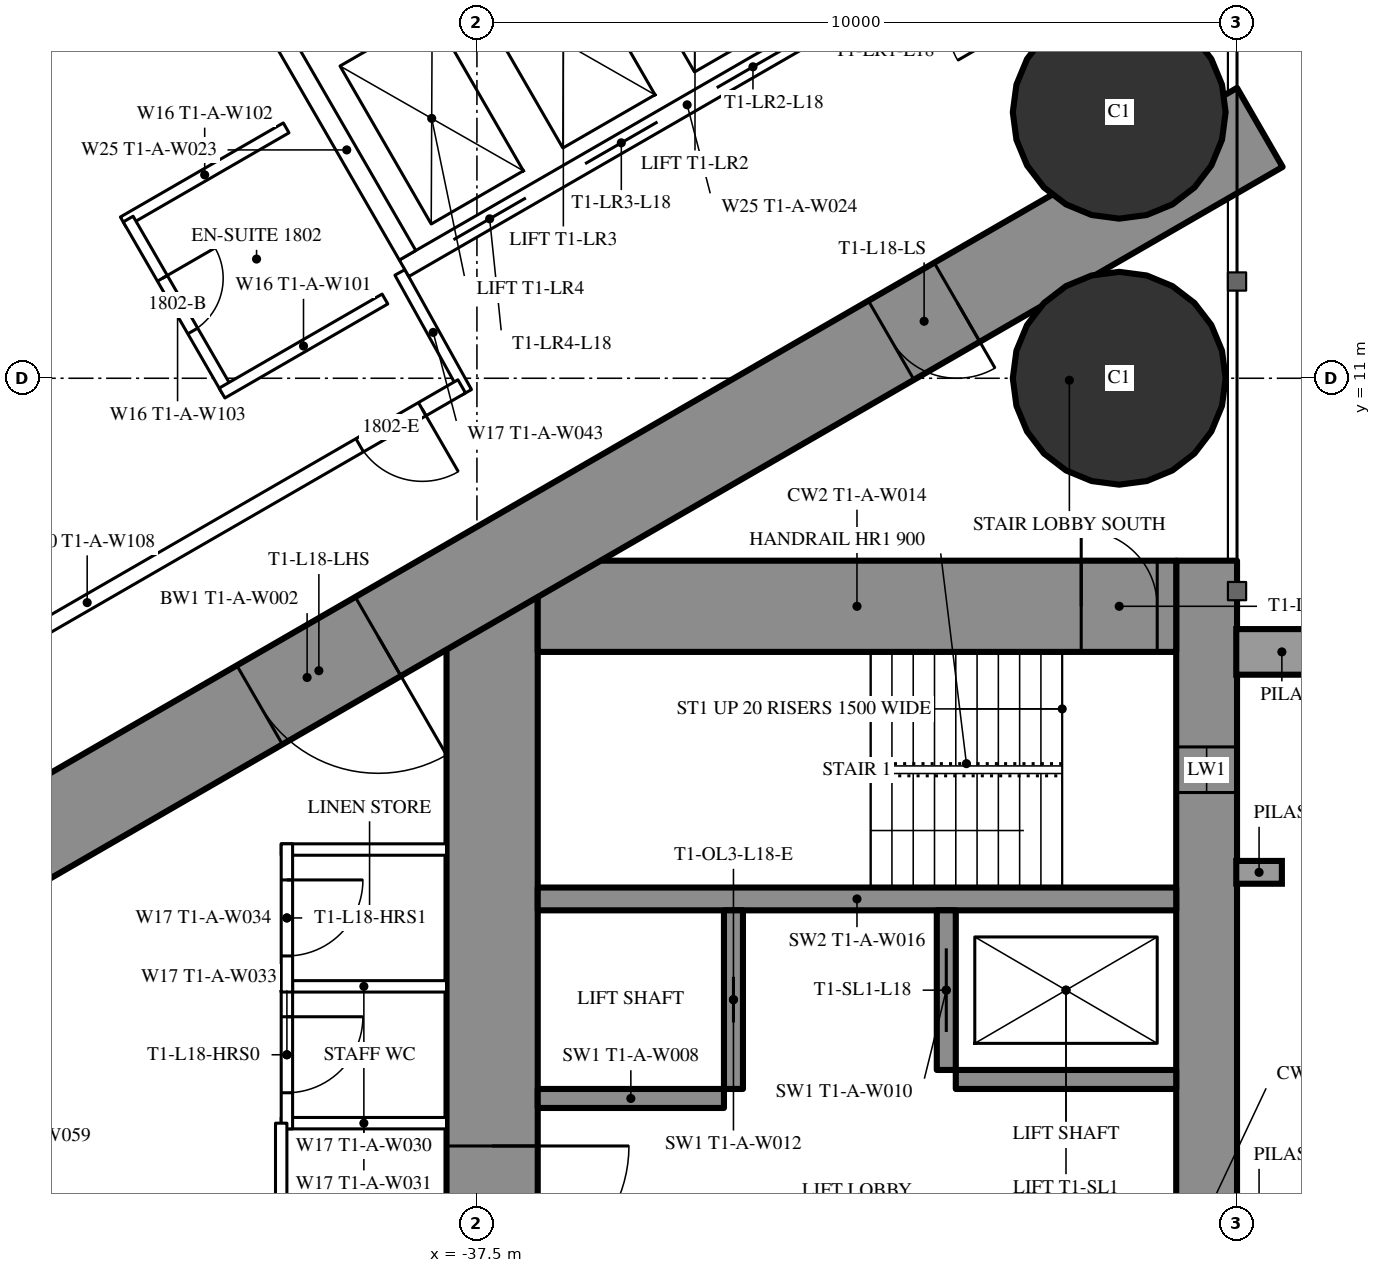
"""IFC4 building model, lengths in metres.
Left out: names, types, materials, properties, quantities, classifications, styles, units other than length and angle.
Written with IfcOpenShell. Run it as: python <this file> out.ifc"""

import sys

from ifc_helpers import new_model, si_unit, direction, frame, frame_2d, origin, origin_2d, place, context, subcontext, project, spatial, rectangle, hollow_circle, extrude, element, fill, save


model = new_model("IFC4")
c1 = context("Model", 3, precision=1e-05, world=origin(), true_north=direction((0.0, 1.0)))
c2 = subcontext(c1, "Body", "Model", "MODEL_VIEW")
j1 = project(units=[si_unit("LENGTHUNIT", "METRE"), si_unit("PLANEANGLEUNIT", "RADIAN")], contexts=[c1])
p1 = place(None, origin())
s1 = spatial("IfcSite", under=j1, at=p1, CompositionType="ELEMENT")
p2 = place(p1, origin())
s2 = spatial("IfcBuilding", under=s1, at=p2, CompositionType="ELEMENT")
p3 = place(p2, frame((0.0, 0.0, 70.5)))
s3 = spatial("IfcBuildingStorey", under=s2, at=p3, CompositionType="ELEMENT", Elevation=70.5)
for number, where, z_axis, x_axis in (
    (1, (-29.05, 11.0, 0.0), (0.0, 0.0, 1.0), (1.0, 0.0, 0.0)),
    (2, (-29.05, 14.5, 0.0), (0.0, 0.0, 1.0), (1.0, 0.0, 0.0)),
):
    element("IfcColumn", number, at=place(p3, frame(where, z_axis=z_axis, x_axis=x_axis)), inside=s3, PredefinedType="COLUMN", context=c2, shape_type="SweptSolid", body=[
        extrude(hollow_circle(Radius=1.4, WallThickness=0.12, at=origin_2d()), origin(), (0.0, 0.0, 1.0), 3.5),
    ])
p4 = place(p3, frame((-27.9, 8.6, 0.0), z_axis=(0.0, 0.0, 1.0), x_axis=(0.0, -1.0, 0.0)))
e3 = element("IfcWall", 3, at=p4, inside=s3, PredefinedType="SHEAR", context=c2, shape_type="SweptSolid", body=[
    extrude(rectangle(XDim=17.2, YDim=0.8, at=frame_2d((8.6, 0.0))), origin(), (0.0, 0.0, 1.0), 3.5),
])
p5 = place(p4, frame((2.45, 0.0, 0.6)))
e4 = element("IfcOpeningElement", 4, at=p5, cuts=e3, PredefinedType="OPENING", context=c2, shape_type="SweptSolid", body=[
    extrude(rectangle(XDim=0.6, YDim=2.1, at=frame_2d((0.3, 1.05))), frame((0.0, 0.41, 0.0), z_axis=(0.0, -1.0, 0.0), x_axis=(1.0, 0.0, 0.0)), (0.0, 0.0, 1.0), 0.82),
])
p6 = place(p4, frame((14.15, 0.0, 0.6)))
e5 = element("IfcOpeningElement", 5, at=p6, cuts=e3, PredefinedType="OPENING", context=c2, shape_type="SweptSolid", body=[
    extrude(rectangle(XDim=0.6, YDim=2.1, at=frame_2d((0.3, 1.05))), frame((0.0, 0.41, 0.0), z_axis=(0.0, -1.0, 0.0), x_axis=(1.0, 0.0, 0.0)), (0.0, 0.0, 1.0), 0.82),
])
p7 = place(p3, frame((-37.3, 8.6, 0.0), z_axis=(0.0, 0.0, 1.0), x_axis=(0.0, -1.0, 0.0)))
e6 = element("IfcWall", 6, at=p7, inside=s3, PredefinedType="SHEAR", context=c2, shape_type="SweptSolid", body=[
    extrude(rectangle(XDim=17.2, YDim=1.2, at=frame_2d((8.6, 0.0))), origin(), (0.0, 0.0, 1.0), 3.5),
])
p8 = place(p7, frame((7.7, 0.0, 0.0)))
e7 = element("IfcOpeningElement", 7, at=p8, cuts=e6, PredefinedType="OPENING", context=c2, shape_type="SweptSolid", body=[
    extrude(rectangle(XDim=1.8, YDim=2.2, at=frame_2d((0.9, 1.1))), frame((0.0, 0.61, 0.0), z_axis=(0.0, -1.0, 0.0), x_axis=(1.0, 0.0, 0.0)), (0.0, 0.0, 1.0), 1.22),
])
p9 = place(p3, frame((-28.3, 8.0, 0.0), z_axis=(0.0, 0.0, 1.0), x_axis=(-1.0, 0.0, 0.0)))
e8 = element("IfcWall", 8, at=p9, inside=s3, PredefinedType="SHEAR", context=c2, shape_type="SweptSolid", body=[
    extrude(rectangle(XDim=8.4, YDim=1.2, at=frame_2d((4.2, 0.0))), origin(), (0.0, 0.0, 1.0), 3.5),
])
p10 = place(p9, frame((0.25, 0.0, 0.0)))
e9 = element("IfcOpeningElement", 9, at=p10, cuts=e8, PredefinedType="OPENING", context=c2, shape_type="SweptSolid", body=[
    extrude(rectangle(XDim=1.0, YDim=2.2, at=frame_2d((0.5, 1.1))), frame((0.0, 0.61, 0.0), z_axis=(0.0, -1.0, 0.0), x_axis=(1.0, 0.0, 0.0)), (0.0, 0.0, 1.0), 1.22),
])
p11 = place(p3, frame((-28.3, 4.15, 0.0), z_axis=(0.0, 0.0, 1.0), x_axis=(-1.0, 0.0, 0.0)))
e10 = element("IfcWall", 10, at=p11, inside=s3, PredefinedType="SHEAR", context=c2, shape_type="SweptSolid", body=[
    extrude(rectangle(XDim=8.4, YDim=0.3, at=frame_2d((4.2, 0.0))), origin(), (0.0, 0.0, 1.0), 3.5),
])
p12 = place(p3, frame((-31.325, 4.0, 0.0), z_axis=(0.0, 0.0, 1.0), x_axis=(0.0, -1.0, 0.0)))
e11 = element("IfcWall", 11, at=p12, inside=s3, PredefinedType="SHEAR", context=c2, shape_type="SweptSolid", body=[
    extrude(rectangle(XDim=2.1, YDim=0.25, at=frame_2d((1.05, 0.0))), origin(), (0.0, 0.0, 1.0), 3.5),
])
p13 = place(p12, frame((0.5, 0.0, 0.0)))
e12 = element("IfcOpeningElement", 12, at=p13, cuts=e11, PredefinedType="OPENING", context=c2, shape_type="SweptSolid", body=[
    extrude(rectangle(XDim=1.1, YDim=2.2, at=frame_2d((0.55, 1.1))), frame((0.0, 0.135, 0.0), z_axis=(0.0, -1.0, 0.0), x_axis=(1.0, 0.0, 0.0)), (0.0, 0.0, 1.0), 0.27),
])
p14 = place(p3, frame((-34.125, 4.0, 0.0), z_axis=(0.0, 0.0, 1.0), x_axis=(0.0, -1.0, 0.0)))
e13 = element("IfcWall", 13, at=p14, inside=s3, PredefinedType="SHEAR", context=c2, shape_type="SweptSolid", body=[
    extrude(rectangle(XDim=2.35, YDim=0.25, at=frame_2d((1.175, 0.0))), origin(), (0.0, 0.0, 1.0), 3.5),
])
p15 = place(p14, frame((0.875, 0.0, 0.0)))
e14 = element("IfcOpeningElement", 14, at=p15, cuts=e13, PredefinedType="OPENING", context=c2, shape_type="SweptSolid", body=[
    extrude(rectangle(XDim=0.6, YDim=2.0, at=frame_2d((0.3, 1.0))), frame((0.0, 0.135, 0.0), z_axis=(0.0, -1.0, 0.0), x_axis=(1.0, 0.0, 0.0)), (0.0, 0.0, 1.0), 0.27),
])
p16 = place(p3, frame((-28.3, 1.775, 0.0), z_axis=(0.0, 0.0, 1.0), x_axis=(-1.0, 0.0, 0.0)))
e15 = element("IfcWall", 15, at=p16, inside=s3, PredefinedType="SHEAR", context=c2, shape_type="SweptSolid", body=[
    extrude(rectangle(XDim=2.9, YDim=0.25, at=frame_2d((1.45, 0.0))), origin(), (0.0, 0.0, 1.0), 3.5),
])
p17 = place(p3, frame((-34.25, 1.525, 0.0), z_axis=(0.0, 0.0, 1.0), x_axis=(-1.0, 0.0, 0.0)))
e16 = element("IfcWall", 16, at=p17, inside=s3, PredefinedType="SHEAR", context=c2, shape_type="SweptSolid", body=[
    extrude(rectangle(XDim=2.45, YDim=0.25, at=frame_2d((1.225, 0.0))), origin(), (0.0, 0.0, 1.0), 3.5),
])
p18 = place(p3, frame((-27.2, 14.3, 0.0), z_axis=(0.0, 0.0, 1.0), x_axis=(-0.866026593062, -0.499997940104, 0.0)))
e17 = element("IfcWall", 17, at=p18, inside=s3, PredefinedType="SHEAR", context=c2, shape_type="SweptSolid", body=[
    extrude(rectangle(XDim=28.946, YDim=1.2, at=frame_2d((14.473, 0.0))), origin(), (0.0, 0.0, 1.0), 3.5),
])
p19 = place(p18, frame((4.6, 0.0, 0.0)))
e18 = element("IfcOpeningElement", 18, at=p19, cuts=e17, PredefinedType="OPENING", context=c2, shape_type="SweptSolid", body=[
    extrude(rectangle(XDim=1.0, YDim=2.2, at=frame_2d((0.5, 1.1))), frame((0.0, 0.61, 0.0), z_axis=(0.0, -1.0, 0.0), x_axis=(1.0, 0.0, 0.0)), (0.0, 0.0, 1.0), 1.22),
])
p20 = place(p18, frame((13.395, 0.0, 0.0)))
e19 = element("IfcOpeningElement", 19, at=p20, cuts=e17, PredefinedType="OPENING", context=c2, shape_type="SweptSolid", body=[
    extrude(rectangle(XDim=1.8, YDim=2.2, at=frame_2d((0.9, 1.1))), frame((0.0, 0.61, 0.0), z_axis=(0.0, -1.0, 0.0), x_axis=(1.0, 0.0, 0.0)), (0.0, 0.0, 1.0), 1.22),
])
p21 = place(p3, frame((-27.572, 16.741, 0.0), z_axis=(0.0, 0.0, 1.0), x_axis=(-0.866034618596, -0.499984039138, 0.0)))
e20 = element("IfcWall", 20, at=p21, inside=s3, PredefinedType="PARTITIONING", context=c2, shape_type="SweptSolid", body=[
    extrude(rectangle(XDim=2.854, YDim=0.2, at=frame_2d((1.427, 0.0))), origin(), (0.0, 0.0, 1.0), 3.25),
])
p22 = place(p3, frame((-38.513, 12.392, 0.0), z_axis=(0.0, 0.0, 1.0), x_axis=(0.485585508183, -0.874189175317, 0.0)))
e21 = element("IfcWall", 21, at=p22, inside=s3, PredefinedType="PARTITIONING", context=c2, shape_type="SweptSolid", body=[
    extrude(rectangle(XDim=1.805, YDim=0.15, at=frame_2d((0.902, 0.0))), origin(), (0.0, 0.0, 1.0), 3.25),
])
p23 = place(p3, frame((-30.033, 15.205, 0.0), z_axis=(0.0, 0.0, 1.0), x_axis=(-0.499980071345, 0.866036909293, 0.0)))
e22 = element("IfcWall", 22, at=p23, inside=s3, PredefinedType="PARTITIONING", context=c2, shape_type="SweptSolid", body=[
    extrude(rectangle(XDim=1.805, YDim=0.15, at=frame_2d((0.902, 0.0))), origin(), (0.0, 0.0, 1.0), 3.25),
])
p24 = place(p23, frame((0.552, 0.0, 0.0)))
e23 = element("IfcOpeningElement", 23, at=p24, cuts=e22, PredefinedType="OPENING", context=c2, shape_type="SweptSolid", body=[
    extrude(rectangle(XDim=1.0, YDim=2.2, at=frame_2d((0.5, 1.1))), frame((0.0, 0.085, 0.0), z_axis=(0.0, -1.0, 0.0), x_axis=(1.0, 0.0, 0.0)), (0.0, 0.0, 1.0), 0.17),
])
p25 = place(p3, frame((-37.7, 10.894, 0.0), z_axis=(0.0, 0.0, 1.0), x_axis=(-0.866024459167, -0.500001636122, 0.0)))
e24 = element("IfcWall", 24, at=p25, inside=s3, PredefinedType="PARTITIONING", context=c2, shape_type="SweptSolid", body=[
    extrude(rectangle(XDim=11.38, YDim=0.2, at=frame_2d((5.69, 0.0))), origin(), (0.0, 0.0, 1.0), 3.25),
])
p26 = place(p25, frame((0.6, 0.0, 0.0)))
e25 = element("IfcOpeningElement", 25, at=p26, cuts=e24, PredefinedType="OPENING", context=c2, shape_type="SweptSolid", body=[
    extrude(rectangle(XDim=0.95, YDim=2.2, at=frame_2d((0.475, 1.1))), frame((0.0, 0.11, 0.0), z_axis=(0.0, -1.0, 0.0), x_axis=(1.0, 0.0, 0.0)), (0.0, 0.0, 1.0), 0.22),
])
p27 = place(p3, frame((-40.01, 14.294, 0.0), z_axis=(0.0, 0.0, 1.0), x_axis=(-0.866031185235, -0.4999899861, 0.0)))
e26 = element("IfcWall", 26, at=p27, inside=s3, PredefinedType="PARTITIONING", context=c2, shape_type="SweptSolid", body=[
    extrude(rectangle(XDim=2.475, YDim=0.15, at=frame_2d((1.238, 0.0))), origin(), (0.0, 0.0, 1.0), 3.25),
])
p28 = place(p3, frame((-40.788, 10.843, 0.0), z_axis=(0.0, 0.0, 1.0), x_axis=(-0.500006934395, 0.866021400173, 0.0)))
e27 = element("IfcWall", 27, at=p28, inside=s3, PredefinedType="PARTITIONING", context=c2, shape_type="SweptSolid", body=[
    extrude(rectangle(XDim=2.6, YDim=0.15, at=frame_2d((1.3, 0.0))), origin(), (0.0, 0.0, 1.0), 3.25),
])
p29 = place(p28, frame((0.9, 0.0, 0.0)))
e28 = element("IfcOpeningElement", 28, at=p29, cuts=e27, PredefinedType="OPENING", context=c2, shape_type="SweptSolid", body=[
    extrude(rectangle(XDim=0.8, YDim=2.2, at=frame_2d((0.4, 1.1))), frame((0.0, 0.085, 0.0), z_axis=(0.0, -1.0, 0.0), x_axis=(1.0, 0.0, 0.0)), (0.0, 0.0, 1.0), 0.17),
])
p30 = place(p3, frame((-38.71, 12.042, 0.0), z_axis=(0.0, 0.0, 1.0), x_axis=(-0.86604923931, -0.499958713387, 0.0)))
e29 = element("IfcWall", 29, at=p30, inside=s3, PredefinedType="PARTITIONING", context=c2, shape_type="SweptSolid", body=[
    extrude(rectangle(XDim=2.475, YDim=0.15, at=frame_2d((1.237, 0.0))), origin(), (0.0, 0.0, 1.0), 3.25),
])
for number, where, z_axis, x_axis in (
    (30, (-37.9, 1.2, 0.0), (0.0, 0.0, 1.0), (-1.0, 0.0, 0.0)),
    (31, (-37.9, 3.0, 0.0), (0.0, 0.0, 1.0), (-1.0, 0.0, 0.0)),
    (32, (-37.9, 4.8, 0.0), (0.0, 0.0, 1.0), (-1.0, 0.0, 0.0)),
):
    element("IfcWall", number, at=place(p3, frame(where, z_axis=z_axis, x_axis=x_axis)), inside=s3, PredefinedType="PARTITIONING", context=c2, shape_type="SweptSolid", body=[
        extrude(rectangle(XDim=2.175, YDim=0.15, at=frame_2d((1.087, 0.0))), origin(), (0.0, 0.0, 1.0), 3.25),
    ])
p31 = place(p3, frame((-40.0, 3.075, 0.0), z_axis=(0.0, 0.0, 1.0), x_axis=(0.0, -1.0, 0.0)))
e33 = element("IfcWall", 33, at=p31, inside=s3, PredefinedType="PARTITIONING", context=c2, shape_type="SweptSolid", body=[
    extrude(rectangle(XDim=1.95, YDim=0.15, at=frame_2d((0.975, 0.0))), origin(), (0.0, 0.0, 1.0), 3.25),
])
p32 = place(p31, frame((0.475, 0.0, 0.0)))
e34 = element("IfcOpeningElement", 34, at=p32, cuts=e33, PredefinedType="OPENING", context=c2, shape_type="SweptSolid", body=[
    extrude(rectangle(XDim=1.0, YDim=2.2, at=frame_2d((0.5, 1.1))), frame((0.0, 0.085, 0.0), z_axis=(0.0, -1.0, 0.0), x_axis=(1.0, 0.0, 0.0)), (0.0, 0.0, 1.0), 0.17),
])
p33 = place(p3, frame((-40.0, 4.875, 0.0), z_axis=(0.0, 0.0, 1.0), x_axis=(0.0, -1.0, 0.0)))
e35 = element("IfcWall", 35, at=p33, inside=s3, PredefinedType="PARTITIONING", context=c2, shape_type="SweptSolid", body=[
    extrude(rectangle(XDim=1.95, YDim=0.15, at=frame_2d((0.975, 0.0))), origin(), (0.0, 0.0, 1.0), 3.25),
])
p34 = place(p33, frame((0.475, 0.0, 0.0)))
e36 = element("IfcOpeningElement", 36, at=p34, cuts=e35, PredefinedType="OPENING", context=c2, shape_type="SweptSolid", body=[
    extrude(rectangle(XDim=1.0, YDim=2.2, at=frame_2d((0.5, 1.1))), frame((0.0, 0.085, 0.0), z_axis=(0.0, -1.0, 0.0), x_axis=(1.0, 0.0, 0.0)), (0.0, 0.0, 1.0), 0.17),
])
p35 = place(p3, frame((-40.075, 1.2, 0.0), z_axis=(0.0, 0.0, 1.0), x_axis=(0.0, -1.0, 0.0)))
e37 = element("IfcWall", 37, at=p35, inside=s3, PredefinedType="PARTITIONING", context=c2, shape_type="SweptSolid", body=[
    extrude(rectangle(XDim=7.374, YDim=0.15, at=frame_2d((3.687, 0.0))), origin(), (0.0, 0.0, 1.0), 3.25),
])
p36 = place(p35, frame((2.787, 0.0, 0.0)))
e38 = element("IfcOpeningElement", 38, at=p36, cuts=e37, PredefinedType="OPENING", context=c2, shape_type="SweptSolid", body=[
    extrude(rectangle(XDim=1.8, YDim=2.2, at=frame_2d((0.9, 1.1))), frame((0.0, 0.085, 0.0), z_axis=(0.0, -1.0, 0.0), x_axis=(1.0, 0.0, 0.0)), (0.0, 0.0, 1.0), 0.17),
])
p37 = place(p3, frame((-31.01, 16.747, 0.0), z_axis=(0.0, 0.0, 1.0), x_axis=(-0.866028165386, -0.499995216735, 0.0)))
e39 = element("IfcWall", 39, at=p37, inside=s3, PredefinedType="PARTITIONING", context=c2, shape_type="SweptSolid", body=[
    extrude(rectangle(XDim=8.6, YDim=0.25, at=frame_2d((4.3, 0.0))), origin(), (0.0, 0.0, 1.0), 3.25),
])
p38 = place(p37, frame((0.75, 0.0, 0.0)))
e40 = element("IfcOpeningElement", 40, at=p38, cuts=e39, PredefinedType="OPENING", context=c2, shape_type="SweptSolid", body=[
    extrude(rectangle(XDim=1.1, YDim=2.2, at=frame_2d((0.55, 1.1))), frame((0.0, 0.135, 0.0), z_axis=(0.0, -1.0, 0.0), x_axis=(1.0, 0.0, 0.0)), (0.0, 0.0, 1.0), 0.27),
])
p39 = place(p37, frame((2.75, 0.0, 0.0)))
e41 = element("IfcOpeningElement", 41, at=p39, cuts=e39, PredefinedType="OPENING", context=c2, shape_type="SweptSolid", body=[
    extrude(rectangle(XDim=1.1, YDim=2.2, at=frame_2d((0.55, 1.1))), frame((0.0, 0.135, 0.0), z_axis=(0.0, -1.0, 0.0), x_axis=(1.0, 0.0, 0.0)), (0.0, 0.0, 1.0), 0.27),
])
p40 = place(p37, frame((4.75, 0.0, 0.0)))
e42 = element("IfcOpeningElement", 42, at=p40, cuts=e39, PredefinedType="OPENING", context=c2, shape_type="SweptSolid", body=[
    extrude(rectangle(XDim=1.1, YDim=2.2, at=frame_2d((0.55, 1.1))), frame((0.0, 0.135, 0.0), z_axis=(0.0, -1.0, 0.0), x_axis=(1.0, 0.0, 0.0)), (0.0, 0.0, 1.0), 0.27),
])
p41 = place(p37, frame((6.75, 0.0, 0.0)))
e43 = element("IfcOpeningElement", 43, at=p41, cuts=e39, PredefinedType="OPENING", context=c2, shape_type="SweptSolid", body=[
    extrude(rectangle(XDim=1.1, YDim=2.2, at=frame_2d((0.55, 1.1))), frame((0.0, 0.135, 0.0), z_axis=(0.0, -1.0, 0.0), x_axis=(1.0, 0.0, 0.0)), (0.0, 0.0, 1.0), 0.27),
])
p42 = place(p3, frame((-38.413, 12.618, 0.0), z_axis=(0.0, 0.0, 1.0), x_axis=(-0.499872130319, 0.866099216793, 0.0)))
e44 = element("IfcWall", 44, at=p42, inside=s3, PredefinedType="PARTITIONING", context=c2, shape_type="SweptSolid", body=[
    extrude(rectangle(XDim=3.2, YDim=0.25, at=frame_2d((1.6, 0.0))), origin(), (0.0, 0.0, 1.0), 3.25),
])
p43 = place(p29, origin())
e45 = element("IfcDoor", 45, at=p43, inside=s3, OperationType="SINGLE_SWING_RIGHT", PredefinedType="DOOR", context=c2, shape_type="SweptSolid", body=[
    extrude(rectangle(XDim=0.8, YDim=2.2, at=frame_2d((0.4, 1.1))), frame((0.0, 0.025, 0.0), z_axis=(0.0, -1.0, 0.0), x_axis=(1.0, 0.0, 0.0)), (0.0, 0.0, 1.0), 0.05),
])
fill(e28, e45)
p44 = place(p26, origin())
e46 = element("IfcDoor", 46, at=p44, inside=s3, OperationType="SINGLE_SWING_LEFT", PredefinedType="DOOR", context=c2, shape_type="SweptSolid", body=[
    extrude(rectangle(XDim=0.95, YDim=2.2, at=frame_2d((0.475, 1.1))), frame((0.0, 0.025, 0.0), z_axis=(0.0, -1.0, 0.0), x_axis=(1.0, 0.0, 0.0)), (0.0, 0.0, 1.0), 0.05),
])
fill(e25, e46)
p45 = place(p32, origin())
e47 = element("IfcDoor", 47, at=p45, inside=s3, OperationType="SINGLE_SWING_LEFT", PredefinedType="DOOR", context=c2, shape_type="SweptSolid", body=[
    extrude(rectangle(XDim=1.0, YDim=2.2, at=frame_2d((0.5, 1.1))), frame((0.0, 0.025, 0.0), z_axis=(0.0, -1.0, 0.0), x_axis=(1.0, 0.0, 0.0)), (0.0, 0.0, 1.0), 0.05),
])
fill(e34, e47)
p46 = place(p34, origin())
e48 = element("IfcDoor", 48, at=p46, inside=s3, OperationType="SINGLE_SWING_LEFT", PredefinedType="DOOR", context=c2, shape_type="SweptSolid", body=[
    extrude(rectangle(XDim=1.0, YDim=2.2, at=frame_2d((0.5, 1.1))), frame((0.0, 0.025, 0.0), z_axis=(0.0, -1.0, 0.0), x_axis=(1.0, 0.0, 0.0)), (0.0, 0.0, 1.0), 0.05),
])
fill(e36, e48)
p47 = place(p19, origin())
e49 = element("IfcDoor", 49, at=p47, inside=s3, OperationType="SINGLE_SWING_LEFT", PredefinedType="DOOR", context=c2, shape_type="SweptSolid", body=[
    extrude(rectangle(XDim=1.0, YDim=2.2, at=frame_2d((0.5, 1.1))), frame((0.0, 0.025, 0.0), z_axis=(0.0, -1.0, 0.0), x_axis=(1.0, 0.0, 0.0)), (0.0, 0.0, 1.0), 0.05),
])
fill(e18, e49)
p48 = place(p20, origin())
e50 = element("IfcDoor", 50, at=p48, inside=s3, OperationType="DOUBLE_DOOR_SINGLE_SWING", PredefinedType="DOOR", context=c2, shape_type="SweptSolid", body=[
    extrude(rectangle(XDim=1.8, YDim=2.2, at=frame_2d((0.9, 1.1))), frame((0.0, 0.025, 0.0), z_axis=(0.0, -1.0, 0.0), x_axis=(1.0, 0.0, 0.0)), (0.0, 0.0, 1.0), 0.05),
])
fill(e19, e50)
p49 = place(p8, origin())
e51 = element("IfcDoor", 51, at=p49, inside=s3, OperationType="DOUBLE_DOOR_SINGLE_SWING", PredefinedType="DOOR", context=c2, shape_type="SweptSolid", body=[
    extrude(rectangle(XDim=1.8, YDim=2.2, at=frame_2d((0.9, 1.1))), frame((0.0, 0.025, 0.0), z_axis=(0.0, -1.0, 0.0), x_axis=(1.0, 0.0, 0.0)), (0.0, 0.0, 1.0), 0.05),
])
fill(e7, e51)
p50 = place(p10, origin())
e52 = element("IfcDoor", 52, at=p50, inside=s3, OperationType="SINGLE_SWING_RIGHT", PredefinedType="DOOR", context=c2, shape_type="SweptSolid", body=[
    extrude(rectangle(XDim=1.0, YDim=2.2, at=frame_2d((0.5, 1.1))), frame((0.0, 0.025, 0.0), z_axis=(0.0, -1.0, 0.0), x_axis=(1.0, 0.0, 0.0)), (0.0, 0.0, 1.0), 0.05),
])
fill(e9, e52)
p51 = place(p13, origin())
e53 = element("IfcDoor", 53, at=p51, inside=s3, OperationType="SLIDING_TO_LEFT", PredefinedType="USERDEFINED", context=c2, shape_type="SweptSolid", body=[
    extrude(rectangle(XDim=1.1, YDim=2.2, at=frame_2d((0.55, 1.1))), frame((0.0, 0.025, 0.0), z_axis=(0.0, -1.0, 0.0), x_axis=(1.0, 0.0, 0.0)), (0.0, 0.0, 1.0), 0.05),
])
fill(e12, e53)
p52 = place(p15, origin())
e54 = element("IfcDoor", 54, at=p52, inside=s3, OperationType="SLIDING_TO_LEFT", PredefinedType="DOOR", context=c2, shape_type="SweptSolid", body=[
    extrude(rectangle(XDim=0.6, YDim=2.0, at=frame_2d((0.3, 1.0))), frame((0.0, 0.025, 0.0), z_axis=(0.0, -1.0, 0.0), x_axis=(1.0, 0.0, 0.0)), (0.0, 0.0, 1.0), 0.05),
])
fill(e14, e54)
p53 = place(p39, origin())
e55 = element("IfcDoor", 55, at=p53, inside=s3, OperationType="DOUBLE_DOOR_SLIDING", PredefinedType="USERDEFINED", context=c2, shape_type="SweptSolid", body=[
    extrude(rectangle(XDim=1.1, YDim=2.2, at=frame_2d((0.55, 1.1))), frame((0.0, 0.025, 0.0), z_axis=(0.0, -1.0, 0.0), x_axis=(1.0, 0.0, 0.0)), (0.0, 0.0, 1.0), 0.05),
])
fill(e41, e55)
p54 = place(p40, origin())
e56 = element("IfcDoor", 56, at=p54, inside=s3, OperationType="DOUBLE_DOOR_SLIDING", PredefinedType="USERDEFINED", context=c2, shape_type="SweptSolid", body=[
    extrude(rectangle(XDim=1.1, YDim=2.2, at=frame_2d((0.55, 1.1))), frame((0.0, 0.025, 0.0), z_axis=(0.0, -1.0, 0.0), x_axis=(1.0, 0.0, 0.0)), (0.0, 0.0, 1.0), 0.05),
])
fill(e42, e56)
p55 = place(p41, origin())
e57 = element("IfcDoor", 57, at=p55, inside=s3, OperationType="DOUBLE_DOOR_SLIDING", PredefinedType="USERDEFINED", context=c2, shape_type="SweptSolid", body=[
    extrude(rectangle(XDim=1.1, YDim=2.2, at=frame_2d((0.55, 1.1))), frame((0.0, 0.025, 0.0), z_axis=(0.0, -1.0, 0.0), x_axis=(1.0, 0.0, 0.0)), (0.0, 0.0, 1.0), 0.05),
])
fill(e43, e57)
p56 = place(p5, origin())
e58 = element("IfcWindow", 58, at=p56, inside=s3, PartitioningType="SINGLE_PANEL", PredefinedType="WINDOW", context=c2, shape_type="SweptSolid", body=[
    extrude(rectangle(XDim=0.6, YDim=2.1, at=frame_2d((0.3, 1.05))), frame((0.0, 0.03, 0.0), z_axis=(0.0, -1.0, 0.0), x_axis=(1.0, 0.0, 0.0)), (0.0, 0.0, 1.0), 0.06),
])
fill(e4, e58)
save(model, sys.argv[1])
